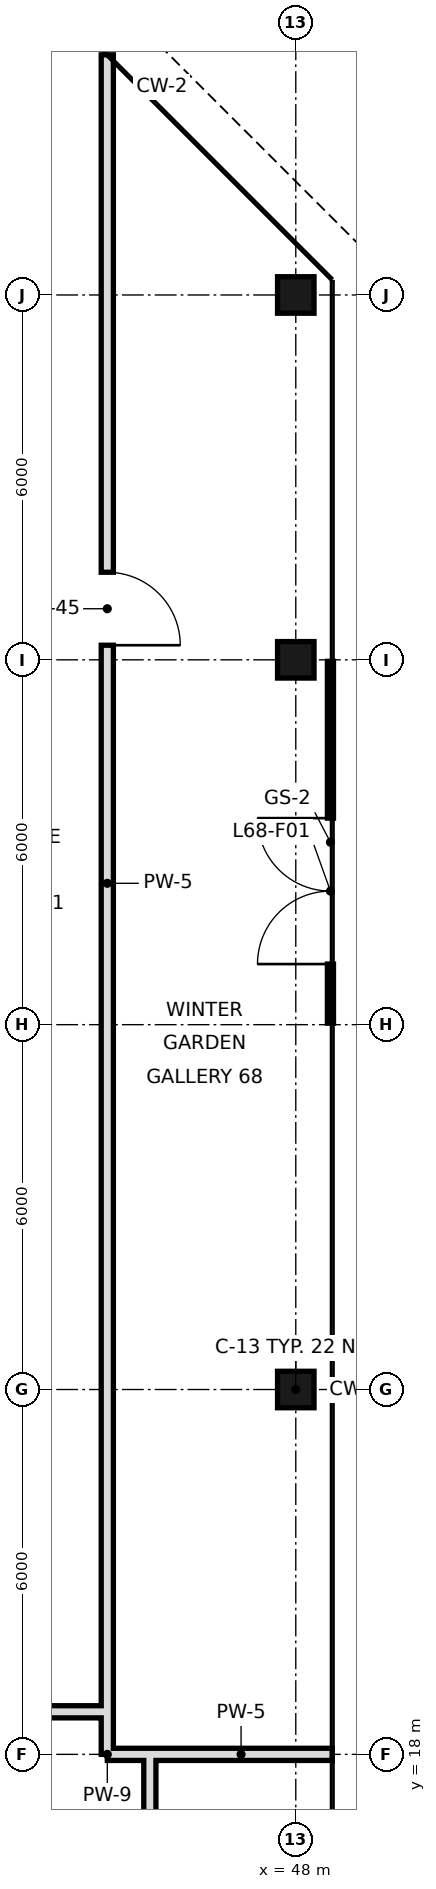
"""IFC4 building model, lengths in metres.
Left out: names, types, materials, properties, quantities, classifications, styles, units other than length and angle.
Written with IfcOpenShell. Run it as: python <this file> out.ifc"""

import sys

from ifc_helpers import new_model, si_unit, direction, frame, frame_2d, origin, origin_2d, place, context, subcontext, project, spatial, rectangle, hollow_rectangle, extrude, element, fill, save


model = new_model("IFC4")
c1 = context("Model", 3, precision=1e-05, world=origin(), true_north=direction((0.0, 1.0)))
c2 = subcontext(c1, "Body", "Model", "MODEL_VIEW")
j1 = project(units=[si_unit("LENGTHUNIT", "METRE"), si_unit("PLANEANGLEUNIT", "RADIAN")], contexts=[c1])
p1 = place(None, origin())
s1 = spatial("IfcSite", under=j1, at=p1, CompositionType="ELEMENT")
p2 = place(p1, origin())
s2 = spatial("IfcBuilding", under=s1, at=p2, CompositionType="ELEMENT")
p3 = place(p2, frame((0.0, 0.0, 290.8)))
s3 = spatial("IfcBuildingStorey", under=s2, at=p3, CompositionType="ELEMENT", Elevation=290.8)
for number, where, z_axis, x_axis in (
    (1, (48.0, 24.0, 0.0), (0.0, 0.0, 1.0), (1.0, 0.0, 0.0)),
    (2, (48.0, 36.0, 0.0), (0.0, 0.0, 1.0), (1.0, 0.0, 0.0)),
    (3, (48.0, 42.0, 0.0), (0.0, 0.0, 1.0), (1.0, 0.0, 0.0)),
):
    element("IfcColumn", number, at=place(p3, frame(where, z_axis=z_axis, x_axis=x_axis)), inside=s3, PredefinedType="COLUMN", context=c2, shape_type="SweptSolid", body=[
        extrude(hollow_rectangle(XDim=0.6, YDim=0.6, WallThickness=0.028, at=origin_2d()), origin(), (0.0, 0.0, 1.0), 3.6),
    ])
p4 = place(p3, frame((48.57, 30.025, 0.0), z_axis=(0.0, 0.0, 1.0), x_axis=(0.0, 1.0, 0.0)))
e4 = element("IfcWall", 4, at=p4, inside=s3, PredefinedType="SOLIDWALL", context=c2, shape_type="SweptSolid", body=[
    extrude(rectangle(XDim=5.95, YDim=0.1, at=frame_2d((2.975, 0.0))), origin(), (0.0, 0.0, 1.0), 3.42),
])
p5 = place(p4, frame((0.971, 0.0, 0.0)))
e5 = element("IfcOpeningElement", 5, at=p5, cuts=e4, PredefinedType="OPENING", context=c2, shape_type="SweptSolid", body=[
    extrude(rectangle(XDim=2.4, YDim=2.4, at=frame_2d((1.2, 1.2))), frame((0.0, 0.06, 0.0), z_axis=(0.0, -1.0, 0.0), x_axis=(1.0, 0.0, 0.0)), (0.0, 0.0, 1.0), 0.12),
])
p6 = place(p3, frame((44.9, 18.7, 0.0), z_axis=(0.0, 0.0, 1.0), x_axis=(0.0, 1.0, 0.0)))
e6 = element("IfcWall", 6, at=p6, inside=s3, PredefinedType="SOLIDWALL", context=c2, shape_type="SweptSolid", body=[
    extrude(rectangle(XDim=27.249, YDim=0.2, at=frame_2d((13.625, 0.0))), origin(), (0.0, 0.0, 1.0), 2.97),
])
p7 = place(p6, frame((17.54, 0.0, 0.0)))
e7 = element("IfcOpeningElement", 7, at=p7, cuts=e6, PredefinedType="OPENING", context=c2, shape_type="SweptSolid", body=[
    extrude(rectangle(XDim=1.2, YDim=2.4, at=frame_2d((0.6, 1.2))), frame((0.0, 0.11, 0.0), z_axis=(0.0, -1.0, 0.0), x_axis=(1.0, 0.0, 0.0)), (0.0, 0.0, 1.0), 0.22),
])
p8 = place(p3, frame((44.9, 18.0, 0.0), z_axis=(0.0, 0.0, 1.0), x_axis=(0.0, 1.0, 0.0)))
e8 = element("IfcWall", 8, at=p8, inside=s3, PredefinedType="SOLIDWALL", context=c2, shape_type="SweptSolid", body=[
    extrude(rectangle(XDim=0.7, YDim=0.2, at=frame_2d((0.35, 0.0))), origin(), (0.0, 0.0, 1.0), 2.97),
])
p9 = place(p3, frame((45.6, 10.8, 0.0), z_axis=(0.0, 0.0, 1.0), x_axis=(0.0, 1.0, 0.0)))
e9 = element("IfcWall", 9, at=p9, inside=s3, PredefinedType="SOLIDWALL", context=c2, shape_type="SweptSolid", body=[
    extrude(rectangle(XDim=7.2, YDim=0.2, at=frame_2d((3.6, 0.0))), origin(), (0.0, 0.0, 1.0), 2.72),
])
p10 = place(p3, frame((45.6, 18.0, 0.0), z_axis=(0.0, 0.0, 1.0), x_axis=(1.0, 0.0, 0.0)))
e10 = element("IfcWall", 10, at=p10, inside=s3, PredefinedType="SOLIDWALL", context=c2, shape_type="SweptSolid", body=[
    extrude(rectangle(XDim=3.0, YDim=0.2, at=frame_2d((1.5, 0.0))), origin(), (0.0, 0.0, 1.0), 2.72),
])
p11 = place(p3, frame((44.9, 18.0, 0.0), z_axis=(0.0, 0.0, 1.0), x_axis=(1.0, 0.0, 0.0)))
e11 = element("IfcWall", 11, at=p11, inside=s3, PredefinedType="SOLIDWALL", context=c2, shape_type="SweptSolid", body=[
    extrude(rectangle(XDim=0.7, YDim=0.2, at=frame_2d((0.35, 0.0))), origin(), (0.0, 0.0, 1.0), 2.97),
])
p12 = place(p3, frame((40.8, 18.7, 0.0), z_axis=(0.0, 0.0, 1.0), x_axis=(1.0, 0.0, 0.0)))
e12 = element("IfcWall", 12, at=p12, inside=s3, PredefinedType="SOLIDWALL", context=c2, shape_type="SweptSolid", body=[
    extrude(rectangle(XDim=4.1, YDim=0.2, at=frame_2d((2.05, 0.0))), origin(), (0.0, 0.0, 1.0), 2.72),
])
p13 = place(p5, origin())
e13 = element("IfcDoor", 13, at=p13, inside=s3, OperationType="DOUBLE_DOOR_SINGLE_SWING", PredefinedType="DOOR", context=c2, shape_type="SweptSolid", body=[
    extrude(rectangle(XDim=2.4, YDim=2.4, at=frame_2d((1.2, 1.2))), frame((0.0, 0.025, 0.0), z_axis=(0.0, -1.0, 0.0), x_axis=(1.0, 0.0, 0.0)), (0.0, 0.0, 1.0), 0.05),
])
fill(e5, e13)
p14 = place(p7, frame((1.2, 0.0, 0.0), z_axis=(0.0, 0.0, 1.0), x_axis=(-1.0, 0.0, 0.0)))
e14 = element("IfcDoor", 14, at=p14, inside=s3, OperationType="SINGLE_SWING_RIGHT", PredefinedType="DOOR", context=c2, shape_type="SweptSolid", body=[
    extrude(rectangle(XDim=1.2, YDim=2.4, at=frame_2d((0.6, 1.2))), frame((0.0, 0.025, 0.0), z_axis=(0.0, -1.0, 0.0), x_axis=(1.0, 0.0, 0.0)), (0.0, 0.0, 1.0), 0.05),
])
fill(e7, e14)
save(model, sys.argv[1])
